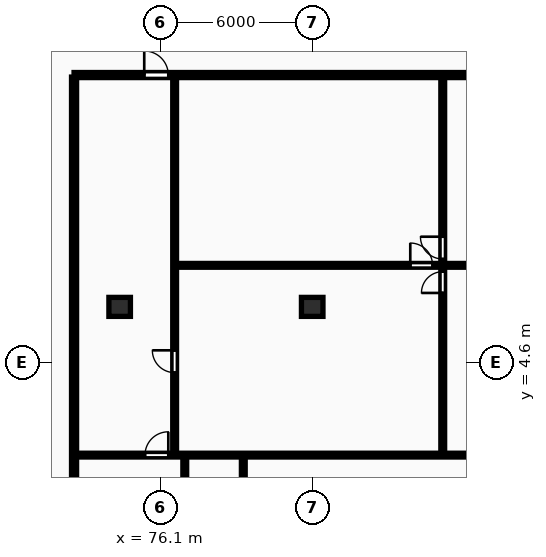
"""IFC4 building model, lengths in metres.
Left out: names, types, materials, properties, quantities, classifications, styles, units other than length and angle.
Written with IfcOpenShell. Run it as: python <this file> out.ifc"""

import sys

from ifc_helpers import new_model, si_unit, direction, frame, frame_2d, origin, origin_2d, place, context, subcontext, project, spatial, rectangle, extrude, element, fill, save


model = new_model("IFC4")
c1 = context("Model", 3, precision=1e-05, world=origin(), true_north=direction((0.0, 1.0)))
c2 = subcontext(c1, "Body", "Model", "MODEL_VIEW")
j1 = project(units=[si_unit("LENGTHUNIT", "METRE"), si_unit("PLANEANGLEUNIT", "RADIAN")], contexts=[c1])
p1 = place(None, origin())
s1 = spatial("IfcSite", under=j1, at=p1, CompositionType="ELEMENT")
p2 = place(p1, origin())
s2 = spatial("IfcBuilding", under=s1, at=p2, CompositionType="ELEMENT")
p3 = place(p2, frame((0.0, 0.0, 126.3)))
s3 = spatial("IfcBuildingStorey", under=s2, at=p3, CompositionType="ELEMENT", Elevation=126.3)
for number, where, z_axis, x_axis in (
    (1, (74.5, 6.8, 0.0), (0.0, 0.0, 1.0), (1.0, 0.0, 0.0)),
    (2, (82.1, 6.8, 0.0), (0.0, 0.0, 1.0), (1.0, 0.0, 0.0)),
):
    element("IfcColumn", number, at=place(p3, frame(where, z_axis=z_axis, x_axis=x_axis)), inside=s3, PredefinedType="COLUMN", context=c2, shape_type="SweptSolid", body=[
        extrude(rectangle(XDim=0.85, YDim=0.75, at=origin_2d()), origin(), (0.0, 0.0, 1.0), 3.25),
    ])
p4 = place(p3, frame((72.7, -8.7, 0.0), z_axis=(0.0, 0.0, 1.0), x_axis=(0.0, 1.0, 0.0)))
e3 = element("IfcWall", 3, at=p4, inside=s3, PredefinedType="PARTITIONING", context=c2, shape_type="SweptSolid", body=[
    extrude(rectangle(XDim=24.57, YDim=0.2, at=frame_2d((12.285, 0.0))), origin(), (0.0, 0.0, 1.0), 2.97),
])
p5 = place(p3, frame((87.252, 0.99, 0.0), z_axis=(0.0, 0.0, 1.0), x_axis=(0.0, 1.0, 0.0)))
e4 = element("IfcWall", 4, at=p5, inside=s3, PredefinedType="PARTITIONING", context=c2, shape_type="SweptSolid", body=[
    extrude(rectangle(XDim=14.9, YDim=0.15, at=frame_2d((7.45, 0.0))), origin(), (0.0, 0.0, 1.0), 2.97),
])
p6 = place(p5, frame((6.36, 0.0, 0.0)))
e5 = element("IfcOpeningElement", 5, at=p6, cuts=e4, PredefinedType="OPENING", context=c2, shape_type="SweptSolid", body=[
    extrude(rectangle(XDim=0.84, YDim=2.04, at=frame_2d((0.42, 1.02))), frame((0.0, 0.085, 0.0), z_axis=(0.0, -1.0, 0.0), x_axis=(1.0, 0.0, 0.0)), (0.0, 0.0, 1.0), 0.17),
])
p7 = place(p5, frame((7.7, 0.0, 0.0)))
e6 = element("IfcOpeningElement", 6, at=p7, cuts=e4, PredefinedType="OPENING", context=c2, shape_type="SweptSolid", body=[
    extrude(rectangle(XDim=0.88, YDim=2.06, at=frame_2d((0.44, 1.03))), frame((0.0, 0.085, 0.0), z_axis=(0.0, -1.0, 0.0), x_axis=(1.0, 0.0, 0.0)), (0.0, 0.0, 1.0), 0.17),
])
p8 = place(p3, frame((76.73, 8.44, 0.0), z_axis=(0.0, 0.0, 1.0), x_axis=(1.0, 0.0, 0.0)))
e7 = element("IfcWall", 7, at=p8, inside=s3, PredefinedType="PARTITIONING", context=c2, shape_type="SweptSolid", body=[
    extrude(rectangle(XDim=20.844, YDim=0.15, at=frame_2d((10.422, 0.0))), origin(), (0.0, 0.0, 1.0), 2.97),
])
p9 = place(p8, frame((9.241, 0.0, 0.0)))
e8 = element("IfcOpeningElement", 8, at=p9, cuts=e7, PredefinedType="OPENING", context=c2, shape_type="SweptSolid", body=[
    extrude(rectangle(XDim=0.88, YDim=2.06, at=frame_2d((0.44, 1.03))), frame((0.0, 0.085, 0.0), z_axis=(0.0, -1.0, 0.0), x_axis=(1.0, 0.0, 0.0)), (0.0, 0.0, 1.0), 0.17),
])
p10 = place(p3, frame((76.67, 0.99, 0.0), z_axis=(0.0, 0.0, 1.0), x_axis=(0.0, 1.0, 0.0)))
e9 = element("IfcWall", 9, at=p10, inside=s3, PredefinedType="PARTITIONING", context=c2, shape_type="SweptSolid", body=[
    extrude(rectangle(XDim=14.9, YDim=0.15, at=frame_2d((7.45, 0.0))), origin(), (0.0, 0.0, 1.0), 2.97),
])
p11 = place(p10, frame((3.216, 0.0, 0.0)))
e10 = element("IfcOpeningElement", 10, at=p11, cuts=e9, PredefinedType="OPENING", context=c2, shape_type="SweptSolid", body=[
    extrude(rectangle(XDim=0.88, YDim=2.06, at=frame_2d((0.44, 1.03))), frame((0.0, 0.085, 0.0), z_axis=(0.0, -1.0, 0.0), x_axis=(1.0, 0.0, 0.0)), (0.0, 0.0, 1.0), 0.17),
])
p12 = place(p3, frame((79.38, -1.67, 0.0), z_axis=(0.0, 0.0, 1.0), x_axis=(0.0, 1.0, 0.0)))
e11 = element("IfcWall", 11, at=p12, inside=s3, PredefinedType="PARTITIONING", context=c2, shape_type="SweptSolid", body=[
    extrude(rectangle(XDim=2.58, YDim=0.15, at=frame_2d((1.29, 0.0))), origin(), (0.0, 0.0, 1.0), 2.97),
])
p13 = place(p3, frame((77.07, -8.7, 0.0), z_axis=(0.0, 0.0, 1.0), x_axis=(0.0, 1.0, 0.0)))
e12 = element("IfcWall", 12, at=p13, inside=s3, PredefinedType="PARTITIONING", context=c2, shape_type="SweptSolid", body=[
    extrude(rectangle(XDim=9.61, YDim=0.15, at=frame_2d((4.805, 0.0))), origin(), (0.0, 0.0, 1.0), 2.97),
])
p14 = place(p13, frame((5.81, 0.0, 0.0)))
e13 = element("IfcOpeningElement", 13, at=p14, cuts=e12, PredefinedType="OPENING", context=c2, shape_type="SweptSolid", body=[
    extrude(rectangle(XDim=0.92, YDim=2.08, at=frame_2d((0.46, 1.04))), frame((0.0, 0.085, 0.0), z_axis=(0.0, -1.0, 0.0), x_axis=(1.0, 0.0, 0.0)), (0.0, 0.0, 1.0), 0.17),
])
p15 = place(p3, frame((72.78, 0.95, 0.0), z_axis=(0.0, 0.0, 1.0), x_axis=(1.0, 0.0, 0.0)))
e14 = element("IfcWall", 14, at=p15, inside=s3, PredefinedType="PARTITIONING", context=c2, shape_type="SweptSolid", body=[
    extrude(rectangle(XDim=24.794, YDim=0.15, at=frame_2d((12.397, 0.0))), origin(), (0.0, 0.0, 1.0), 2.97),
])
p16 = place(p15, frame((2.72, 0.0, 0.0)))
e15 = element("IfcOpeningElement", 15, at=p16, cuts=e14, PredefinedType="OPENING", context=c2, shape_type="SweptSolid", body=[
    extrude(rectangle(XDim=0.92, YDim=2.08, at=frame_2d((0.46, 1.04))), frame((0.0, 0.085, 0.0), z_axis=(0.0, -1.0, 0.0), x_axis=(1.0, 0.0, 0.0)), (0.0, 0.0, 1.0), 0.17),
])
p17 = place(p3, frame((72.7, 15.95, 0.0), z_axis=(0.0, 0.0, 1.0), x_axis=(1.0, 0.0, 0.0)))
e16 = element("IfcWall", 16, at=p17, inside=s3, PredefinedType="PARTITIONING", context=c2, shape_type="SweptSolid", body=[
    extrude(rectangle(XDim=58.0, YDim=0.2, at=frame_2d((29.0, 0.0))), origin(), (0.0, 0.0, 1.0), 2.97),
])
p18 = place(p17, frame((2.77, 0.0, 0.0)))
e17 = element("IfcOpeningElement", 17, at=p18, cuts=e16, PredefinedType="OPENING", context=c2, shape_type="SweptSolid", body=[
    extrude(rectangle(XDim=0.95, YDim=2.15, at=frame_2d((0.475, 1.075))), frame((0.0, 0.11, 0.0), z_axis=(0.0, -1.0, 0.0), x_axis=(1.0, 0.0, 0.0)), (0.0, 0.0, 1.0), 0.22),
])
p19 = place(p17, frame((25.324, 0.0, 0.0)))
e18 = element("IfcOpeningElement", 18, at=p19, cuts=e16, PredefinedType="OPENING", context=c2, shape_type="SweptSolid", body=[
    extrude(rectangle(XDim=0.95, YDim=2.15, at=frame_2d((0.475, 1.075))), frame((0.0, 0.11, 0.0), z_axis=(0.0, -1.0, 0.0), x_axis=(1.0, 0.0, 0.0)), (0.0, 0.0, 1.0), 0.22),
])
p20 = place(p17, frame((46.356, 0.0, 0.0)))
e19 = element("IfcOpeningElement", 19, at=p20, cuts=e16, PredefinedType="OPENING", context=c2, shape_type="SweptSolid", body=[
    extrude(rectangle(XDim=0.95, YDim=2.15, at=frame_2d((0.475, 1.075))), frame((0.0, 0.11, 0.0), z_axis=(0.0, -1.0, 0.0), x_axis=(1.0, 0.0, 0.0)), (0.0, 0.0, 1.0), 0.22),
])
p21 = place(p6, origin())
e20 = element("IfcDoor", 20, at=p21, inside=s3, OperationType="SINGLE_SWING_LEFT", PredefinedType="DOOR", context=c2, shape_type="SweptSolid", body=[
    extrude(rectangle(XDim=0.84, YDim=2.04, at=frame_2d((0.42, 1.02))), frame((0.0, 0.025, 0.0), z_axis=(0.0, -1.0, 0.0), x_axis=(1.0, 0.0, 0.0)), (0.0, 0.0, 1.0), 0.05),
])
fill(e5, e20)
p22 = place(p7, origin())
e21 = element("IfcDoor", 21, at=p22, inside=s3, OperationType="SINGLE_SWING_RIGHT", PredefinedType="DOOR", context=c2, shape_type="SweptSolid", body=[
    extrude(rectangle(XDim=0.88, YDim=2.06, at=frame_2d((0.44, 1.03))), frame((0.0, 0.025, 0.0), z_axis=(0.0, -1.0, 0.0), x_axis=(1.0, 0.0, 0.0)), (0.0, 0.0, 1.0), 0.05),
])
fill(e6, e21)
p23 = place(p9, origin())
e22 = element("IfcDoor", 22, at=p23, inside=s3, OperationType="SINGLE_SWING_LEFT", PredefinedType="DOOR", context=c2, shape_type="SweptSolid", body=[
    extrude(rectangle(XDim=0.88, YDim=2.06, at=frame_2d((0.44, 1.03))), frame((0.0, 0.025, 0.0), z_axis=(0.0, -1.0, 0.0), x_axis=(1.0, 0.0, 0.0)), (0.0, 0.0, 1.0), 0.05),
])
fill(e8, e22)
p24 = place(p11, origin())
e23 = element("IfcDoor", 23, at=p24, inside=s3, OperationType="SINGLE_SWING_RIGHT", PredefinedType="DOOR", context=c2, shape_type="SweptSolid", body=[
    extrude(rectangle(XDim=0.88, YDim=2.06, at=frame_2d((0.44, 1.03))), frame((0.0, 0.025, 0.0), z_axis=(0.0, -1.0, 0.0), x_axis=(1.0, 0.0, 0.0)), (0.0, 0.0, 1.0), 0.05),
])
fill(e10, e23)
p25 = place(p16, origin())
e24 = element("IfcDoor", 24, at=p25, inside=s3, OperationType="SINGLE_SWING_RIGHT", PredefinedType="DOOR", context=c2, shape_type="SweptSolid", body=[
    extrude(rectangle(XDim=0.92, YDim=2.08, at=frame_2d((0.46, 1.04))), frame((0.0, 0.025, 0.0), z_axis=(0.0, -1.0, 0.0), x_axis=(1.0, 0.0, 0.0)), (0.0, 0.0, 1.0), 0.05),
])
fill(e15, e24)
p26 = place(p18, origin())
e25 = element("IfcDoor", 25, at=p26, inside=s3, OperationType="SINGLE_SWING_LEFT", PredefinedType="DOOR", context=c2, shape_type="SweptSolid", body=[
    extrude(rectangle(XDim=0.95, YDim=2.15, at=frame_2d((0.475, 1.075))), frame((0.0, 0.025, 0.0), z_axis=(0.0, -1.0, 0.0), x_axis=(1.0, 0.0, 0.0)), (0.0, 0.0, 1.0), 0.05),
])
fill(e17, e25)
save(model, sys.argv[1])
